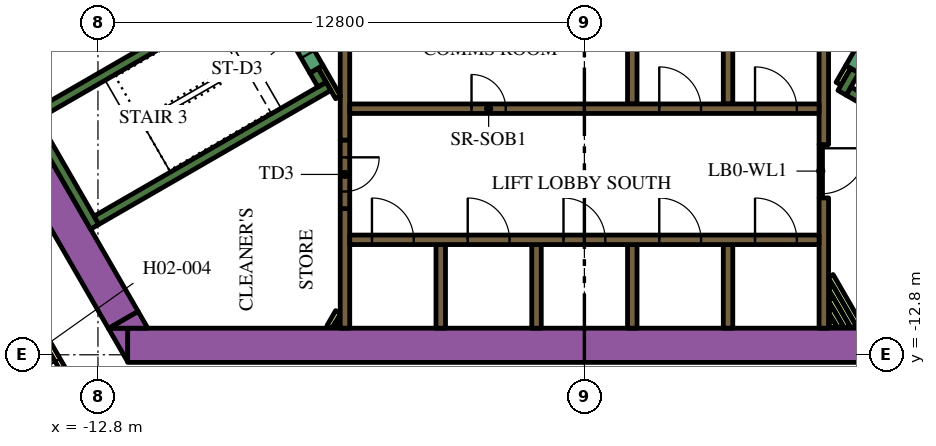
"""IFC4 building model, lengths in metres.
Left out: names, types, materials, properties, quantities, classifications, styles, units other than length and angle.
Written with IfcOpenShell. Run it as: python <this file> out.ifc"""

import sys

from ifc_helpers import new_model, si_unit, direction, frame, frame_2d, origin, place, context, subcontext, project, spatial, polyline, rectangle, outline, extrude, element, fill, save


model = new_model("IFC4")
c1 = context("Model", 3, precision=1e-05, world=origin(), true_north=direction((0.0, 1.0)))
c2 = subcontext(c1, "Body", "Model", "MODEL_VIEW")
j1 = project(units=[si_unit("LENGTHUNIT", "METRE"), si_unit("PLANEANGLEUNIT", "RADIAN")], contexts=[c1])
p1 = place(None, origin())
s1 = spatial("IfcSite", under=j1, at=p1, CompositionType="ELEMENT")
p2 = place(p1, origin())
s2 = spatial("IfcBuilding", under=s1, at=p2, CompositionType="ELEMENT")
p3 = place(p2, frame((0.0, 0.0, 47.1)))
s3 = spatial("IfcBuildingStorey", under=s2, at=p3, CompositionType="ELEMENT", Elevation=47.1)
p4 = place(p3, frame((-12.019, -12.55, 0.0), z_axis=(0.0, 0.0, 1.0), x_axis=(1.0, 0.0, 0.0)))
e1 = element("IfcWall", 1, at=p4, inside=s3, PredefinedType="SOLIDWALL", context=c2, shape_type="SweptSolid", body=[
    extrude(rectangle(XDim=22.083, YDim=0.9, at=frame_2d((11.042, 0.0))), origin(), (0.0, 0.0, 1.0), 3.9),
])
p5 = place(p3, origin())
e2 = element("IfcWall", 2, at=p5, inside=s3, PredefinedType="SOLIDWALL", context=c2, shape_type="SweptSolid", body=[
    extrude(outline(polyline([(-12.529, -12.1), (-12.021, -12.1), (-12.021, -12.98), (-12.529, -12.1)])), origin(), (0.0, 0.0, 1.0), 3.9),
])
p6 = place(p3, frame((-12.134, -11.883, 0.0), z_axis=(0.0, 0.0, 1.0), x_axis=(-0.500005339912, 0.866022320763, 0.0)))
e3 = element("IfcWall", 3, at=p6, inside=s3, PredefinedType="SOLIDWALL", context=c2, shape_type="SweptSolid", body=[
    extrude(rectangle(XDim=9.488, YDim=0.9, at=frame_2d((4.744, 0.0))), origin(), (0.0, 0.0, 1.0), 3.9),
])
e4 = element("IfcWall", 4, at=p5, inside=s3, PredefinedType="SOLIDWALL", context=c2, shape_type="SweptSolid", body=[
    extrude(outline(polyline([(-11.489, -12.1), (-12.505, -12.1), (-11.743, -11.66), (-11.489, -12.1)])), origin(), (0.0, 0.0, 1.0), 3.9),
])
p7 = place(p3, frame((12.84, -9.261, 0.0), z_axis=(0.0, 0.0, 1.0), x_axis=(-0.866013990052, 0.500019768644, 0.0)))
e5 = element("IfcWall", 5, at=p7, inside=s3, PredefinedType="SOLIDWALL", context=c2, shape_type="SweptSolid", body=[
    extrude(rectangle(XDim=6.8, YDim=0.25, at=frame_2d((3.4, 0.0))), origin(), (0.0, 0.0, 1.0), 3.9),
])
p8 = place(p3, frame((6.78, -5.906, 0.0), z_axis=(0.0, 0.0, 1.0), x_axis=(0.500223362819, 0.865896406789, 0.0)))
e6 = element("IfcWall", 6, at=p8, inside=s3, PredefinedType="SOLIDWALL", context=c2, shape_type="SweptSolid", body=[
    extrude(rectangle(XDim=0.675, YDim=0.25, at=frame_2d((0.337, 0.0))), origin(), (0.0, 0.0, 1.0), 3.9),
])
p9 = place(p3, frame((-12.885, -9.431, 0.0), z_axis=(0.0, 0.0, 1.0), x_axis=(-0.500020560727, 0.866013532718, 0.0)))
e7 = element("IfcWall", 7, at=p9, inside=s3, PredefinedType="SOLIDWALL", context=c2, shape_type="SweptSolid", body=[
    extrude(rectangle(XDim=3.45, YDim=0.25, at=frame_2d((1.725, 0.0))), origin(), (0.0, 0.0, 1.0), 3.9),
])
p10 = place(p3, frame((-14.44, -6.49, 0.0), z_axis=(0.0, 0.0, 1.0), x_axis=(0.866022966069, 0.500004222222, 0.0)))
e8 = element("IfcWall", 8, at=p10, inside=s3, PredefinedType="SOLIDWALL", context=c2, shape_type="SweptSolid", body=[
    extrude(rectangle(XDim=6.8, YDim=0.25, at=frame_2d((3.4, 0.0))), origin(), (0.0, 0.0, 1.0), 3.9),
])
p11 = place(p3, frame((-12.84, -9.261, 0.0), z_axis=(0.0, 0.0, 1.0), x_axis=(0.866016039709, 0.500016218704, 0.0)))
e9 = element("IfcWall", 9, at=p11, inside=s3, PredefinedType="SOLIDWALL", context=c2, shape_type="SweptSolid", body=[
    extrude(rectangle(XDim=7.05, YDim=0.25, at=frame_2d((3.525, 0.0))), origin(), (0.0, 0.0, 1.0), 3.9),
])
p12 = place(p3, frame((-6.905, -5.69, 0.0), z_axis=(0.0, 0.0, 1.0), x_axis=(-0.500402024738, 0.865793170242, 0.0)))
e10 = element("IfcWall", 10, at=p12, inside=s3, PredefinedType="SOLIDWALL", context=c2, shape_type="SweptSolid", body=[
    extrude(rectangle(XDim=0.425, YDim=0.25, at=frame_2d((0.212, 0.0))), origin(), (0.0, 0.0, 1.0), 3.9),
])
p13 = place(p3, frame((-3.78, -12.1, 0.0), z_axis=(0.0, 0.0, 1.0), x_axis=(0.0, 1.0, 0.0)))
e11 = element("IfcWall", 11, at=p13, inside=s3, PredefinedType="SOLIDWALL", context=c2, shape_type="SweptSolid", body=[
    extrude(rectangle(XDim=2.2, YDim=0.25, at=frame_2d((1.1, 0.0))), origin(), (0.0, 0.0, 1.0), 3.9),
])
p14 = place(p3, frame((-6.3, -12.1, 0.0), z_axis=(0.0, 0.0, 1.0), x_axis=(0.0, 1.0, 0.0)))
e12 = element("IfcWall", 12, at=p14, inside=s3, PredefinedType="SOLIDWALL", context=c2, shape_type="SweptSolid", body=[
    extrude(rectangle(XDim=3.146, YDim=0.25, at=frame_2d((1.573, 0.0))), origin(), (0.0, 0.0, 1.0), 3.9),
])
for number, where, z_axis, x_axis in (
    (13, (3.78, -4.0, 0.0), (0.0, 0.0, 1.0), (0.0, -1.0, 0.0)),
    (14, (1.26, -4.0, 0.0), (0.0, 0.0, 1.0), (0.0, -1.0, 0.0)),
):
    element("IfcWall", number, at=place(p3, frame(where, z_axis=z_axis, x_axis=x_axis)), inside=s3, PredefinedType="SOLIDWALL", context=c2, shape_type="SweptSolid", body=[
        extrude(rectangle(XDim=2.2, YDim=0.25, at=frame_2d((1.1, 0.0))), origin(), (0.0, 0.0, 1.0), 3.9),
    ])
p15 = place(p3, frame((-6.3, -3.75, 0.0), z_axis=(0.0, 0.0, 1.0), x_axis=(0.0, -1.0, 0.0)))
e15 = element("IfcWall", 15, at=p15, inside=s3, PredefinedType="SOLIDWALL", context=c2, shape_type="SweptSolid", body=[
    extrude(rectangle(XDim=3.404, YDim=0.25, at=frame_2d((1.702, 0.0))), origin(), (0.0, 0.0, 1.0), 3.9),
])
p16 = place(p3, frame((6.3, -7.27, 0.0), z_axis=(0.0, 0.0, 1.0), x_axis=(0.0, 1.0, 0.0)))
e16 = element("IfcWall", 16, at=p16, inside=s3, PredefinedType="SOLIDWALL", context=c2, shape_type="SweptSolid", body=[
    extrude(rectangle(XDim=3.586, YDim=0.25, at=frame_2d((1.793, 0.0))), origin(), (0.0, 0.0, 1.0), 3.9),
])
p17 = place(p3, frame((6.3, -12.1, 0.0), z_axis=(0.0, 0.0, 1.0), x_axis=(0.0, 1.0, 0.0)))
e17 = element("IfcWall", 17, at=p17, inside=s3, PredefinedType="SOLIDWALL", context=c2, shape_type="SweptSolid", body=[
    extrude(rectangle(XDim=3.428, YDim=0.25, at=frame_2d((1.714, 0.0))), origin(), (0.0, 0.0, 1.0), 3.9),
])
for number, where, z_axis, x_axis in (
    (18, (3.78, -12.1, 0.0), (0.0, 0.0, 1.0), (0.0, 1.0, 0.0)),
    (19, (1.26, -12.1, 0.0), (0.0, 0.0, 1.0), (0.0, 1.0, 0.0)),
    (20, (-1.26, -12.1, 0.0), (0.0, 0.0, 1.0), (0.0, 1.0, 0.0)),
):
    element("IfcWall", number, at=place(p3, frame(where, z_axis=z_axis, x_axis=x_axis)), inside=s3, PredefinedType="SOLIDWALL", context=c2, shape_type="SweptSolid", body=[
        extrude(rectangle(XDim=2.2, YDim=0.25, at=frame_2d((1.1, 0.0))), origin(), (0.0, 0.0, 1.0), 3.9),
    ])
p18 = place(p3, frame((-6.708, -12.068, 0.0), z_axis=(0.0, 0.0, 1.0), x_axis=(0.500000789788, 0.8660249478, 0.0)))
e21 = element("IfcWall", 21, at=p18, inside=s3, PredefinedType="PARTITIONING", context=c2, shape_type="SweptSolid", body=[
    extrude(rectangle(XDim=0.456, YDim=0.15, at=frame_2d((0.228, 0.0))), origin(), (0.0, 0.0, 1.0), 2.75),
])
p19 = place(p3, frame((-6.534, -12.068, 0.0), z_axis=(0.0, 0.0, 1.0), x_axis=(0.500240224089, 0.865886665912, 0.0)))
e22 = element("IfcWall", 22, at=p19, inside=s3, PredefinedType="PARTITIONING", context=c2, shape_type="SweptSolid", body=[
    extrude(rectangle(XDim=0.109, YDim=0.15, at=frame_2d((0.054, 0.0))), origin(), (0.0, 0.0, 1.0), 2.75),
])
p20 = place(p3, frame((-6.48, -6.027, 0.0), z_axis=(0.0, 0.0, 1.0), x_axis=(-0.499927229454, 0.866067413802, 0.0)))
e23 = element("IfcWall", 23, at=p20, inside=s3, PredefinedType="PARTITIONING", context=c2, shape_type="SweptSolid", body=[
    extrude(rectangle(XDim=0.929, YDim=0.15, at=frame_2d((0.464, 0.0))), origin(), (0.0, 0.0, 1.0), 3.9),
])
p21 = place(p3, frame((6.48, -10.726, 0.0), z_axis=(0.0, 0.0, 1.0), x_axis=(0.500017819788, -0.86601511528, 0.0)))
e24 = element("IfcWall", 24, at=p21, inside=s3, PredefinedType="PARTITIONING", context=c2, shape_type="SweptSolid", body=[
    extrude(rectangle(XDim=1.55, YDim=0.15, at=frame_2d((0.775, 0.0))), origin(), (0.0, 0.0, 1.0), 2.75),
])
p22 = place(p3, frame((6.48, -11.026, 0.0), z_axis=(0.0, 0.0, 1.0), x_axis=(0.49995654735, -0.86605048973, 0.0)))
e25 = element("IfcWall", 25, at=p22, inside=s3, PredefinedType="PARTITIONING", context=c2, shape_type="SweptSolid", body=[
    extrude(rectangle(XDim=1.204, YDim=0.15, at=frame_2d((0.602, 0.0))), origin(), (0.0, 0.0, 1.0), 2.75),
])
p23 = place(p3, frame((6.48, -11.326, 0.0), z_axis=(0.0, 0.0, 1.0), x_axis=(0.500059337743, -0.865991142412, 0.0)))
e26 = element("IfcWall", 26, at=p23, inside=s3, PredefinedType="PARTITIONING", context=c2, shape_type="SweptSolid", body=[
    extrude(rectangle(XDim=0.857, YDim=0.15, at=frame_2d((0.429, 0.0))), origin(), (0.0, 0.0, 1.0), 2.75),
])
p24 = place(p3, frame((6.48, -11.626, 0.0), z_axis=(0.0, 0.0, 1.0), x_axis=(0.500301480982, -0.865851273677, 0.0)))
e27 = element("IfcWall", 27, at=p24, inside=s3, PredefinedType="PARTITIONING", context=c2, shape_type="SweptSolid", body=[
    extrude(rectangle(XDim=0.511, YDim=0.15, at=frame_2d((0.255, 0.0))), origin(), (0.0, 0.0, 1.0), 2.75),
])
p25 = place(p3, frame((6.48, -11.926, 0.0), z_axis=(0.0, 0.0, 1.0), x_axis=(0.500450775723, -0.86576499183, 0.0)))
e28 = element("IfcWall", 28, at=p25, inside=s3, PredefinedType="PARTITIONING", context=c2, shape_type="SweptSolid", body=[
    extrude(rectangle(XDim=0.164, YDim=0.15, at=frame_2d((0.082, 0.0))), origin(), (0.0, 0.0, 1.0), 2.75),
])
p26 = place(p3, frame((6.945, -5.222, 0.0), z_axis=(0.0, 0.0, 1.0), x_axis=(-0.499818422106, -0.866130212453, 0.0)))
e29 = element("IfcWall", 29, at=p26, inside=s3, PredefinedType="PARTITIONING", context=c2, shape_type="SweptSolid", body=[
    extrude(rectangle(XDim=0.514, YDim=0.15, at=frame_2d((0.257, 0.0))), origin(), (0.0, 0.0, 1.0), 2.75),
])
p27 = place(p3, frame((-6.175, -9.775, 0.0), z_axis=(0.0, 0.0, 1.0), x_axis=(1.0, 0.0, 0.0)))
e30 = element("IfcWall", 30, at=p27, inside=s3, PredefinedType="SOLIDWALL", context=c2, shape_type="SweptSolid", body=[
    extrude(rectangle(XDim=12.35, YDim=0.25, at=frame_2d((6.175, 0.0))), origin(), (0.0, 0.0, 1.0), 3.9),
])
p28 = place(p27, frame((0.585, 0.0, 0.0)))
e31 = element("IfcOpeningElement", 31, at=p28, cuts=e30, PredefinedType="OPENING", context=c2, shape_type="SweptSolid", body=[
    extrude(rectangle(XDim=1.1, YDim=2.1, at=frame_2d((0.55, 1.05))), frame((0.0, 0.135, 0.0), z_axis=(0.0, -1.0, 0.0), x_axis=(1.0, 0.0, 0.0)), (0.0, 0.0, 1.0), 0.27),
])
p29 = place(p27, frame((3.105, 0.0, 0.0)))
e32 = element("IfcOpeningElement", 32, at=p29, cuts=e30, PredefinedType="OPENING", context=c2, shape_type="SweptSolid", body=[
    extrude(rectangle(XDim=1.1, YDim=2.1, at=frame_2d((0.55, 1.05))), frame((0.0, 0.135, 0.0), z_axis=(0.0, -1.0, 0.0), x_axis=(1.0, 0.0, 0.0)), (0.0, 0.0, 1.0), 0.27),
])
p30 = place(p27, frame((5.625, 0.0, 0.0)))
e33 = element("IfcOpeningElement", 33, at=p30, cuts=e30, PredefinedType="OPENING", context=c2, shape_type="SweptSolid", body=[
    extrude(rectangle(XDim=1.1, YDim=2.1, at=frame_2d((0.55, 1.05))), frame((0.0, 0.135, 0.0), z_axis=(0.0, -1.0, 0.0), x_axis=(1.0, 0.0, 0.0)), (0.0, 0.0, 1.0), 0.27),
])
p31 = place(p27, frame((8.145, 0.0, 0.0)))
e34 = element("IfcOpeningElement", 34, at=p31, cuts=e30, PredefinedType="OPENING", context=c2, shape_type="SweptSolid", body=[
    extrude(rectangle(XDim=1.1, YDim=2.1, at=frame_2d((0.55, 1.05))), frame((0.0, 0.135, 0.0), z_axis=(0.0, -1.0, 0.0), x_axis=(1.0, 0.0, 0.0)), (0.0, 0.0, 1.0), 0.27),
])
p32 = place(p27, frame((10.665, 0.0, 0.0)))
e35 = element("IfcOpeningElement", 35, at=p32, cuts=e30, PredefinedType="OPENING", context=c2, shape_type="SweptSolid", body=[
    extrude(rectangle(XDim=1.1, YDim=2.1, at=frame_2d((0.55, 1.05))), frame((0.0, 0.135, 0.0), z_axis=(0.0, -1.0, 0.0), x_axis=(1.0, 0.0, 0.0)), (0.0, 0.0, 1.0), 0.27),
])
p33 = place(p3, frame((-6.175, -6.325, 0.0), z_axis=(0.0, 0.0, 1.0), x_axis=(1.0, 0.0, 0.0)))
e36 = element("IfcWall", 36, at=p33, inside=s3, PredefinedType="SOLIDWALL", context=c2, shape_type="SweptSolid", body=[
    extrude(rectangle(XDim=12.35, YDim=0.25, at=frame_2d((6.175, 0.0))), origin(), (0.0, 0.0, 1.0), 3.9),
])
p34 = place(p33, frame((3.205, 0.0, 0.0)))
e37 = element("IfcOpeningElement", 37, at=p34, cuts=e36, PredefinedType="OPENING", context=c2, shape_type="SweptSolid", body=[
    extrude(rectangle(XDim=0.9, YDim=2.1, at=frame_2d((0.45, 1.05))), frame((0.0, 0.135, 0.0), z_axis=(0.0, -1.0, 0.0), x_axis=(1.0, 0.0, 0.0)), (0.0, 0.0, 1.0), 0.27),
])
p35 = place(p33, frame((8.145, 0.0, 0.0)))
e38 = element("IfcOpeningElement", 38, at=p35, cuts=e36, PredefinedType="OPENING", context=c2, shape_type="SweptSolid", body=[
    extrude(rectangle(XDim=1.1, YDim=2.1, at=frame_2d((0.55, 1.05))), frame((0.0, 0.135, 0.0), z_axis=(0.0, -1.0, 0.0), x_axis=(1.0, 0.0, 0.0)), (0.0, 0.0, 1.0), 0.27),
])
p36 = place(p33, frame((10.665, 0.0, 0.0)))
e39 = element("IfcOpeningElement", 39, at=p36, cuts=e36, PredefinedType="OPENING", context=c2, shape_type="SweptSolid", body=[
    extrude(rectangle(XDim=1.1, YDim=2.1, at=frame_2d((0.55, 1.05))), frame((0.0, 0.135, 0.0), z_axis=(0.0, -1.0, 0.0), x_axis=(1.0, 0.0, 0.0)), (0.0, 0.0, 1.0), 0.27),
])
p37 = place(p3, frame((7.053, -5.284, 0.0), z_axis=(0.0, 0.0, 1.0), x_axis=(0.500078061341, 0.865980330357, 0.0)))
e40 = element("IfcWall", 40, at=p37, inside=s3, PredefinedType="SOLIDWALL", context=c2, shape_type="SweptSolid", body=[
    extrude(rectangle(XDim=2.1, YDim=0.4, at=frame_2d((1.05, 0.0))), origin(), (0.0, 0.0, 1.0), 3.9),
])
p38 = place(p37, frame((0.45, 0.0, 0.0)))
e41 = element("IfcOpeningElement", 41, at=p38, cuts=e40, PredefinedType="OPENING", context=c2, shape_type="SweptSolid", body=[
    extrude(rectangle(XDim=1.2, YDim=2.1, at=frame_2d((0.6, 1.05))), frame((0.0, 0.21, 0.0), z_axis=(0.0, -1.0, 0.0), x_axis=(1.0, 0.0, 0.0)), (0.0, 0.0, 1.0), 0.42),
])
p39 = place(p3, frame((-8.103, -3.466, 0.0), z_axis=(0.0, 0.0, 1.0), x_axis=(0.500078061341, -0.865980330357, 0.0)))
e42 = element("IfcWall", 42, at=p39, inside=s3, PredefinedType="SOLIDWALL", context=c2, shape_type="SweptSolid", body=[
    extrude(rectangle(XDim=2.1, YDim=0.4, at=frame_2d((1.05, 0.0))), origin(), (0.0, 0.0, 1.0), 3.9),
])
p40 = place(p39, frame((0.45, 0.0, 0.0)))
e43 = element("IfcOpeningElement", 43, at=p40, cuts=e42, PredefinedType="OPENING", context=c2, shape_type="SweptSolid", body=[
    extrude(rectangle(XDim=1.2, YDim=2.1, at=frame_2d((0.6, 1.05))), frame((0.0, 0.21, 0.0), z_axis=(0.0, -1.0, 0.0), x_axis=(1.0, 0.0, 0.0)), (0.0, 0.0, 1.0), 0.42),
])
p41 = place(p3, frame((-6.3, -7.154, 0.0), z_axis=(0.0, 0.0, 1.0), x_axis=(0.0, -1.0, 0.0)))
e44 = element("IfcWall", 44, at=p41, inside=s3, PredefinedType="SOLIDWALL", context=c2, shape_type="SweptSolid", body=[
    extrude(rectangle(XDim=1.8, YDim=0.25, at=frame_2d((0.9, 0.0))), origin(), (0.0, 0.0, 1.0), 3.9),
])
p42 = place(p41, frame((0.45, 0.0, 0.0)))
e45 = element("IfcOpeningElement", 45, at=p42, cuts=e44, PredefinedType="OPENING", context=c2, shape_type="SweptSolid", body=[
    extrude(rectangle(XDim=0.9, YDim=2.1, at=frame_2d((0.45, 1.05))), frame((0.0, 0.135, 0.0), z_axis=(0.0, -1.0, 0.0), x_axis=(1.0, 0.0, 0.0)), (0.0, 0.0, 1.0), 0.27),
])
p43 = place(p3, frame((6.22, -7.266, 0.0), z_axis=(0.0, 0.0, 1.0), x_axis=(0.0, -1.0, 0.0)))
e46 = element("IfcWall", 46, at=p43, inside=s3, PredefinedType="PARTITIONING", context=c2, shape_type="SweptSolid", body=[
    extrude(rectangle(XDim=1.4, YDim=0.09, at=frame_2d((0.7, 0.0))), origin(), (0.0, 0.0, 1.0), 2.75),
])
p44 = place(p43, frame((0.1, 0.0, 0.0)))
e47 = element("IfcOpeningElement", 47, at=p44, cuts=e46, PredefinedType="OPENING", context=c2, shape_type="SweptSolid", body=[
    extrude(rectangle(XDim=1.2, YDim=2.1, at=frame_2d((0.6, 1.05))), frame((0.0, 0.055, 0.0), z_axis=(0.0, -1.0, 0.0), x_axis=(1.0, 0.0, 0.0)), (0.0, 0.0, 1.0), 0.11),
])
p45 = place(p3, frame((-12.918, -14.575, 0.0), z_axis=(0.0, 0.0, 1.0), x_axis=(-0.500009150678, 0.866020120573, 0.0)))
e48 = element("IfcWall", 48, at=p45, inside=s3, PredefinedType="PARTITIONING", context=c2, shape_type="SweptSolid", body=[
    extrude(rectangle(XDim=5.258, YDim=0.15, at=frame_2d((2.629, 0.0))), origin(), (0.0, 0.0, 1.0), 2.75),
])
p46 = place(p45, frame((1.888, 0.0, 0.0)))
e49 = element("IfcOpeningElement", 49, at=p46, cuts=e48, PredefinedType="OPENING", context=c2, shape_type="SweptSolid", body=[
    extrude(rectangle(XDim=1.0, YDim=2.1, at=frame_2d((0.5, 1.05))), frame((0.0, 0.085, 0.0), z_axis=(0.0, -1.0, 0.0), x_axis=(1.0, 0.0, 0.0)), (0.0, 0.0, 1.0), 0.17),
])
p47 = place(p28, origin())
e50 = element("IfcDoor", 50, at=p47, inside=s3, OperationType="DOUBLE_DOOR_SLIDING", PredefinedType="DOOR", context=c2, shape_type="SweptSolid", body=[
    extrude(rectangle(XDim=1.1, YDim=2.1, at=frame_2d((0.55, 1.05))), frame((0.0, 0.025, 0.0), z_axis=(0.0, -1.0, 0.0), x_axis=(1.0, 0.0, 0.0)), (0.0, 0.0, 1.0), 0.05),
])
fill(e31, e50)
p48 = place(p29, origin())
e51 = element("IfcDoor", 51, at=p48, inside=s3, OperationType="DOUBLE_DOOR_SLIDING", PredefinedType="DOOR", context=c2, shape_type="SweptSolid", body=[
    extrude(rectangle(XDim=1.1, YDim=2.1, at=frame_2d((0.55, 1.05))), frame((0.0, 0.025, 0.0), z_axis=(0.0, -1.0, 0.0), x_axis=(1.0, 0.0, 0.0)), (0.0, 0.0, 1.0), 0.05),
])
fill(e32, e51)
p49 = place(p30, origin())
e52 = element("IfcDoor", 52, at=p49, inside=s3, OperationType="DOUBLE_DOOR_SLIDING", PredefinedType="DOOR", context=c2, shape_type="SweptSolid", body=[
    extrude(rectangle(XDim=1.1, YDim=2.1, at=frame_2d((0.55, 1.05))), frame((0.0, 0.025, 0.0), z_axis=(0.0, -1.0, 0.0), x_axis=(1.0, 0.0, 0.0)), (0.0, 0.0, 1.0), 0.05),
])
fill(e33, e52)
p50 = place(p31, origin())
e53 = element("IfcDoor", 53, at=p50, inside=s3, OperationType="DOUBLE_DOOR_SLIDING", PredefinedType="DOOR", context=c2, shape_type="SweptSolid", body=[
    extrude(rectangle(XDim=1.1, YDim=2.1, at=frame_2d((0.55, 1.05))), frame((0.0, 0.025, 0.0), z_axis=(0.0, -1.0, 0.0), x_axis=(1.0, 0.0, 0.0)), (0.0, 0.0, 1.0), 0.05),
])
fill(e34, e53)
p51 = place(p32, origin())
e54 = element("IfcDoor", 54, at=p51, inside=s3, OperationType="DOUBLE_DOOR_SLIDING", PredefinedType="DOOR", context=c2, shape_type="SweptSolid", body=[
    extrude(rectangle(XDim=1.1, YDim=2.1, at=frame_2d((0.55, 1.05))), frame((0.0, 0.025, 0.0), z_axis=(0.0, -1.0, 0.0), x_axis=(1.0, 0.0, 0.0)), (0.0, 0.0, 1.0), 0.05),
])
fill(e35, e54)
p52 = place(p34, origin())
e55 = element("IfcDoor", 55, at=p52, inside=s3, OperationType="SINGLE_SWING_LEFT", PredefinedType="DOOR", context=c2, shape_type="SweptSolid", body=[
    extrude(rectangle(XDim=0.9, YDim=2.1, at=frame_2d((0.45, 1.05))), frame((0.0, 0.025, 0.0), z_axis=(0.0, -1.0, 0.0), x_axis=(1.0, 0.0, 0.0)), (0.0, 0.0, 1.0), 0.05),
])
fill(e37, e55)
p53 = place(p35, origin())
e56 = element("IfcDoor", 56, at=p53, inside=s3, OperationType="DOUBLE_DOOR_SLIDING", PredefinedType="DOOR", context=c2, shape_type="SweptSolid", body=[
    extrude(rectangle(XDim=1.1, YDim=2.1, at=frame_2d((0.55, 1.05))), frame((0.0, 0.025, 0.0), z_axis=(0.0, -1.0, 0.0), x_axis=(1.0, 0.0, 0.0)), (0.0, 0.0, 1.0), 0.05),
])
fill(e38, e56)
p54 = place(p36, origin())
e57 = element("IfcDoor", 57, at=p54, inside=s3, OperationType="DOUBLE_DOOR_SLIDING", PredefinedType="DOOR", context=c2, shape_type="SweptSolid", body=[
    extrude(rectangle(XDim=1.1, YDim=2.1, at=frame_2d((0.55, 1.05))), frame((0.0, 0.025, 0.0), z_axis=(0.0, -1.0, 0.0), x_axis=(1.0, 0.0, 0.0)), (0.0, 0.0, 1.0), 0.05),
])
fill(e39, e57)
p55 = place(p40, origin())
e58 = element("IfcDoor", 58, at=p55, inside=s3, OperationType="SINGLE_SWING_LEFT", PredefinedType="DOOR", context=c2, shape_type="SweptSolid", body=[
    extrude(rectangle(XDim=1.2, YDim=2.1, at=frame_2d((0.6, 1.05))), frame((0.0, 0.025, 0.0), z_axis=(0.0, -1.0, 0.0), x_axis=(1.0, 0.0, 0.0)), (0.0, 0.0, 1.0), 0.05),
])
fill(e43, e58)
p56 = place(p42, origin())
e59 = element("IfcDoor", 59, at=p56, inside=s3, OperationType="SINGLE_SWING_LEFT", PredefinedType="DOOR", context=c2, shape_type="SweptSolid", body=[
    extrude(rectangle(XDim=0.9, YDim=2.1, at=frame_2d((0.45, 1.05))), frame((0.0, 0.025, 0.0), z_axis=(0.0, -1.0, 0.0), x_axis=(1.0, 0.0, 0.0)), (0.0, 0.0, 1.0), 0.05),
])
fill(e45, e59)
p57 = place(p44, origin())
e60 = element("IfcDoor", 60, at=p57, inside=s3, OperationType="SINGLE_SWING_LEFT", PredefinedType="DOOR", context=c2, shape_type="SweptSolid", body=[
    extrude(rectangle(XDim=1.2, YDim=2.1, at=frame_2d((0.6, 1.05))), frame((0.0, 0.025, 0.0), z_axis=(0.0, -1.0, 0.0), x_axis=(1.0, 0.0, 0.0)), (0.0, 0.0, 1.0), 0.05),
])
fill(e47, e60)
p58 = place(p46, origin())
e61 = element("IfcDoor", 61, at=p58, inside=s3, OperationType="SINGLE_SWING_LEFT", PredefinedType="DOOR", context=c2, shape_type="SweptSolid", body=[
    extrude(rectangle(XDim=1.0, YDim=2.1, at=frame_2d((0.5, 1.05))), frame((0.0, 0.025, 0.0), z_axis=(0.0, -1.0, 0.0), x_axis=(1.0, 0.0, 0.0)), (0.0, 0.0, 1.0), 0.05),
])
fill(e49, e61)
save(model, sys.argv[1])
